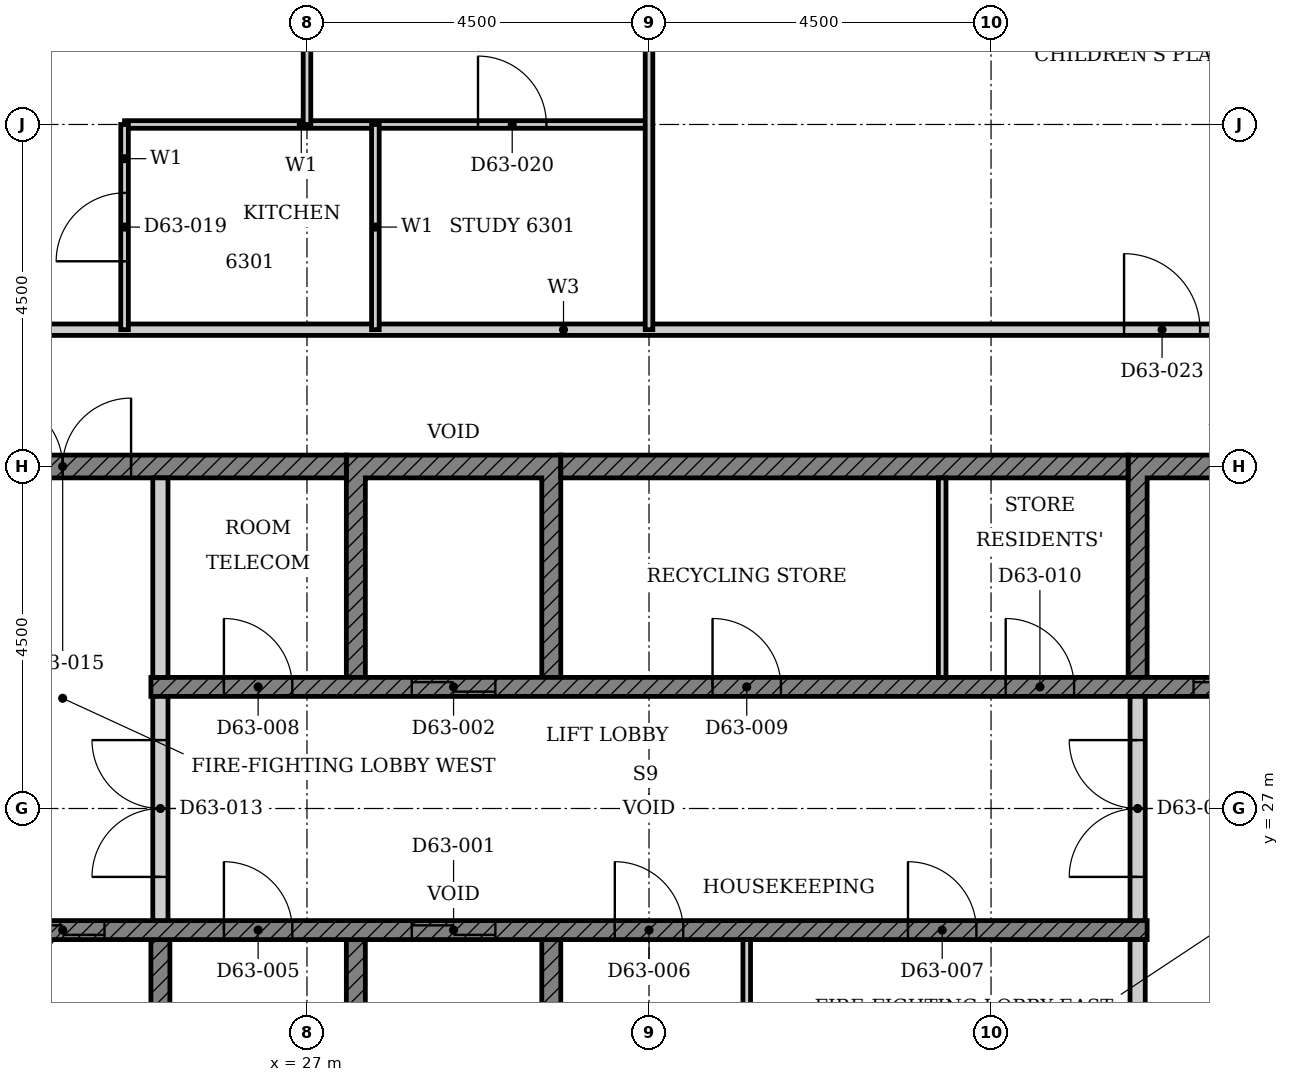
"""IFC4 building model, lengths in metres.
Left out: names, types, materials, properties, quantities, classifications, styles, units other than length and angle.
Written with IfcOpenShell. Run it as: python <this file> out.ifc"""

import sys

from ifc_helpers import new_model, si_unit, direction, frame, frame_2d, origin, place, context, subcontext, project, spatial, polyline, rectangle, outline, extrude, element, fill, save


model = new_model("IFC4")
c1 = context("Model", 3, precision=1e-05, world=origin(), true_north=direction((0.0, 1.0)))
c2 = subcontext(c1, "Body", "Model", "MODEL_VIEW")
j1 = project(units=[si_unit("LENGTHUNIT", "METRE"), si_unit("PLANEANGLEUNIT", "RADIAN")], contexts=[c1])
p1 = place(None, origin())
s1 = spatial("IfcSite", under=j1, at=p1, CompositionType="ELEMENT")
p2 = place(p1, origin())
s2 = spatial("IfcBuilding", under=s1, at=p2, CompositionType="ELEMENT")
p3 = place(p2, frame((0.0, 0.0, 249.0)))
s3 = spatial("IfcBuildingStorey", under=s2, at=p3, CompositionType="ELEMENT", Elevation=249.0)
p4 = place(p3, origin())
e1 = element("IfcWall", 1, at=p4, inside=s3, PredefinedType="SHEAR", context=c2, shape_type="SweptSolid", body=[
    extrude(outline(polyline([(22.375, 22.35), (25.197, 22.35), (25.197, 25.275), (24.947, 25.275), (24.947, 22.65), (22.625, 22.65), (22.625, 25.275), (22.375, 25.275), (22.375, 22.35)])), origin(), (0.0, 0.0, 1.0), 3.4),
])
p5 = place(p3, origin())
e2 = element("IfcWall", 2, at=p5, inside=s3, PredefinedType="SHEAR", context=c2, shape_type="SweptSolid", body=[
    extrude(outline(polyline([(27.518, 22.35), (30.339, 22.35), (30.339, 25.275), (30.089, 25.275), (30.089, 22.65), (27.768, 22.65), (27.768, 25.275), (27.518, 25.275), (27.518, 22.35)])), origin(), (0.0, 0.0, 1.0), 3.4),
])
p6 = place(p3, origin())
e3 = element("IfcWall", 3, at=p6, inside=s3, PredefinedType="SHEAR", context=c2, shape_type="SweptSolid", body=[
    extrude(outline(polyline([(27.518, 28.725), (27.768, 28.725), (27.768, 31.35), (30.089, 31.35), (30.089, 28.725), (30.339, 28.725), (30.339, 31.65), (27.518, 31.65), (27.518, 28.725)])), origin(), (0.0, 0.0, 1.0), 3.4),
])
p7 = place(p3, origin())
e4 = element("IfcWall", 4, at=p7, inside=s3, PredefinedType="SHEAR", context=c2, shape_type="SweptSolid", body=[
    extrude(outline(polyline([(37.803, 28.725), (38.053, 28.725), (38.053, 31.35), (40.375, 31.35), (40.375, 28.725), (40.625, 28.725), (40.625, 31.65), (37.803, 31.65), (37.803, 28.725)])), origin(), (0.0, 0.0, 1.0), 3.4),
])
p8 = place(p3, frame((18.15, 31.5, 0.0), z_axis=(0.0, 0.0, 1.0), x_axis=(1.0, 0.0, 0.0)))
e5 = element("IfcWall", 5, at=p8, inside=s3, PredefinedType="SHEAR", context=c2, shape_type="SweptSolid", body=[
    extrude(rectangle(XDim=9.368, YDim=0.3, at=frame_2d((4.684, 0.0))), origin(), (0.0, 0.0, 1.0), 3.4),
])
p9 = place(p8, frame((4.736, 0.0, 0.0)))
e6 = element("IfcOpeningElement", 6, at=p9, cuts=e5, PredefinedType="OPENING", context=c2, shape_type="SweptSolid", body=[
    extrude(rectangle(XDim=1.8, YDim=2.1, at=frame_2d((0.9, 1.05))), frame((0.0, 0.16, 0.0), z_axis=(0.0, -1.0, 0.0), x_axis=(1.0, 0.0, 0.0)), (0.0, 0.0, 1.0), 0.32),
])
p10 = place(p3, frame((30.339, 31.5, 0.0), z_axis=(0.0, 0.0, 1.0), x_axis=(1.0, 0.0, 0.0)))
e7 = element("IfcWall", 7, at=p10, inside=s3, PredefinedType="SHEAR", context=c2, shape_type="SweptSolid", body=[
    extrude(rectangle(XDim=7.464, YDim=0.3, at=frame_2d((3.732, 0.0))), origin(), (0.0, 0.0, 1.0), 3.4),
])
p11 = place(p3, frame((22.375, 25.4, 0.0), z_axis=(0.0, 0.0, 1.0), x_axis=(1.0, 0.0, 0.0)))
e8 = element("IfcWall", 8, at=p11, inside=s3, PredefinedType="SHEAR", context=c2, shape_type="SweptSolid", body=[
    extrude(rectangle(XDim=15.678, YDim=0.25, at=frame_2d((7.839, 0.0))), origin(), (0.0, 0.0, 1.0), 3.4),
])
p12 = place(p11, frame((6.004, 0.0, 0.0)))
e9 = element("IfcOpeningElement", 9, at=p12, cuts=e8, PredefinedType="OPENING", context=c2, shape_type="SweptSolid", body=[
    extrude(rectangle(XDim=1.1, YDim=2.1, at=frame_2d((0.55, 1.05))), frame((0.0, 0.135, 0.0), z_axis=(0.0, -1.0, 0.0), x_axis=(1.0, 0.0, 0.0)), (0.0, 0.0, 1.0), 0.27),
])
p13 = place(p11, frame((0.861, 0.0, 0.0)))
e10 = element("IfcOpeningElement", 10, at=p13, cuts=e8, PredefinedType="OPENING", context=c2, shape_type="SweptSolid", body=[
    extrude(rectangle(XDim=1.1, YDim=2.1, at=frame_2d((0.55, 1.05))), frame((0.0, 0.135, 0.0), z_axis=(0.0, -1.0, 0.0), x_axis=(1.0, 0.0, 0.0)), (0.0, 0.0, 1.0), 0.27),
])
p14 = place(p11, frame((3.532, 0.0, 0.0)))
e11 = element("IfcOpeningElement", 11, at=p14, cuts=e8, PredefinedType="OPENING", context=c2, shape_type="SweptSolid", body=[
    extrude(rectangle(XDim=0.9, YDim=2.1, at=frame_2d((0.45, 1.05))), frame((0.0, 0.135, 0.0), z_axis=(0.0, -1.0, 0.0), x_axis=(1.0, 0.0, 0.0)), (0.0, 0.0, 1.0), 0.27),
])
p15 = place(p11, frame((8.675, 0.0, 0.0)))
e12 = element("IfcOpeningElement", 12, at=p15, cuts=e8, PredefinedType="OPENING", context=c2, shape_type="SweptSolid", body=[
    extrude(rectangle(XDim=0.9, YDim=2.1, at=frame_2d((0.45, 1.05))), frame((0.0, 0.135, 0.0), z_axis=(0.0, -1.0, 0.0), x_axis=(1.0, 0.0, 0.0)), (0.0, 0.0, 1.0), 0.27),
])
p16 = place(p11, frame((12.532, 0.0, 0.0)))
e13 = element("IfcOpeningElement", 13, at=p16, cuts=e8, PredefinedType="OPENING", context=c2, shape_type="SweptSolid", body=[
    extrude(rectangle(XDim=0.9, YDim=2.1, at=frame_2d((0.45, 1.05))), frame((0.0, 0.135, 0.0), z_axis=(0.0, -1.0, 0.0), x_axis=(1.0, 0.0, 0.0)), (0.0, 0.0, 1.0), 0.27),
])
p17 = place(p3, frame((24.947, 28.6, 0.0), z_axis=(0.0, 0.0, 1.0), x_axis=(1.0, 0.0, 0.0)))
e14 = element("IfcWall", 14, at=p17, inside=s3, PredefinedType="SHEAR", context=c2, shape_type="SweptSolid", body=[
    extrude(rectangle(XDim=15.678, YDim=0.25, at=frame_2d((7.839, 0.0))), origin(), (0.0, 0.0, 1.0), 3.4),
])
p18 = place(p17, frame((3.432, 0.0, 0.0)))
e15 = element("IfcOpeningElement", 15, at=p18, cuts=e14, PredefinedType="OPENING", context=c2, shape_type="SweptSolid", body=[
    extrude(rectangle(XDim=1.1, YDim=2.1, at=frame_2d((0.55, 1.05))), frame((0.0, 0.135, 0.0), z_axis=(0.0, -1.0, 0.0), x_axis=(1.0, 0.0, 0.0)), (0.0, 0.0, 1.0), 0.27),
])
p19 = place(p17, frame((13.718, 0.0, 0.0)))
e16 = element("IfcOpeningElement", 16, at=p19, cuts=e14, PredefinedType="OPENING", context=c2, shape_type="SweptSolid", body=[
    extrude(rectangle(XDim=1.1, YDim=2.1, at=frame_2d((0.55, 1.05))), frame((0.0, 0.135, 0.0), z_axis=(0.0, -1.0, 0.0), x_axis=(1.0, 0.0, 0.0)), (0.0, 0.0, 1.0), 0.27),
])
p20 = place(p17, frame((0.961, 0.0, 0.0)))
e17 = element("IfcOpeningElement", 17, at=p20, cuts=e14, PredefinedType="OPENING", context=c2, shape_type="SweptSolid", body=[
    extrude(rectangle(XDim=0.9, YDim=2.1, at=frame_2d((0.45, 1.05))), frame((0.0, 0.135, 0.0), z_axis=(0.0, -1.0, 0.0), x_axis=(1.0, 0.0, 0.0)), (0.0, 0.0, 1.0), 0.27),
])
p21 = place(p17, frame((7.389, 0.0, 0.0)))
e18 = element("IfcOpeningElement", 18, at=p21, cuts=e14, PredefinedType="OPENING", context=c2, shape_type="SweptSolid", body=[
    extrude(rectangle(XDim=0.9, YDim=2.1, at=frame_2d((0.45, 1.05))), frame((0.0, 0.135, 0.0), z_axis=(0.0, -1.0, 0.0), x_axis=(1.0, 0.0, 0.0)), (0.0, 0.0, 1.0), 0.27),
])
p22 = place(p17, frame((11.246, 0.0, 0.0)))
e19 = element("IfcOpeningElement", 19, at=p22, cuts=e14, PredefinedType="OPENING", context=c2, shape_type="SweptSolid", body=[
    extrude(rectangle(XDim=0.9, YDim=2.1, at=frame_2d((0.45, 1.05))), frame((0.0, 0.135, 0.0), z_axis=(0.0, -1.0, 0.0), x_axis=(1.0, 0.0, 0.0)), (0.0, 0.0, 1.0), 0.27),
])
p23 = place(p3, frame((37.928, 22.65, 0.0), z_axis=(0.0, 0.0, 1.0), x_axis=(0.0, 1.0, 0.0)))
e20 = element("IfcWall", 20, at=p23, inside=s3, PredefinedType="PARTITIONING", context=c2, shape_type="SweptSolid", body=[
    extrude(rectangle(XDim=2.625, YDim=0.2, at=frame_2d((1.312, 0.0))), origin(), (0.0, 0.0, 1.0), 3.4),
])
p24 = place(p3, frame((32.786, 22.65, 0.0), z_axis=(0.0, 0.0, 1.0), x_axis=(0.0, 1.0, 0.0)))
e21 = element("IfcWall", 21, at=p24, inside=s3, PredefinedType="PARTITIONING", context=c2, shape_type="SweptSolid", body=[
    extrude(rectangle(XDim=2.625, YDim=0.1, at=frame_2d((1.312, 0.0))), origin(), (0.0, 0.0, 1.0), 3.4),
])
p25 = place(p3, frame((25.072, 28.725, 0.0), z_axis=(0.0, 0.0, 1.0), x_axis=(0.0, 1.0, 0.0)))
e22 = element("IfcWall", 22, at=p25, inside=s3, PredefinedType="PARTITIONING", context=c2, shape_type="SweptSolid", body=[
    extrude(rectangle(XDim=2.625, YDim=0.2, at=frame_2d((1.312, 0.0))), origin(), (0.0, 0.0, 1.0), 3.4),
])
p26 = place(p3, frame((35.357, 28.725, 0.0), z_axis=(0.0, 0.0, 1.0), x_axis=(0.0, 1.0, 0.0)))
e23 = element("IfcWall", 23, at=p26, inside=s3, PredefinedType="PARTITIONING", context=c2, shape_type="SweptSolid", body=[
    extrude(rectangle(XDim=2.625, YDim=0.1, at=frame_2d((1.312, 0.0))), origin(), (0.0, 0.0, 1.0), 3.4),
])
p27 = place(p3, frame((25.072, 25.525, 0.0), z_axis=(0.0, 0.0, 1.0), x_axis=(0.0, 1.0, 0.0)))
e24 = element("IfcWall", 24, at=p27, inside=s3, PredefinedType="PARTITIONING", context=c2, shape_type="SweptSolid", body=[
    extrude(rectangle(XDim=2.95, YDim=0.2, at=frame_2d((1.475, 0.0))), origin(), (0.0, 0.0, 1.0), 3.4),
])
p28 = place(p27, frame((0.575, 0.0, 0.0)))
e25 = element("IfcOpeningElement", 25, at=p28, cuts=e24, PredefinedType="OPENING", context=c2, shape_type="SweptSolid", body=[
    extrude(rectangle(XDim=1.8, YDim=2.1, at=frame_2d((0.9, 1.05))), frame((0.0, 0.11, 0.0), z_axis=(0.0, -1.0, 0.0), x_axis=(1.0, 0.0, 0.0)), (0.0, 0.0, 1.0), 0.22),
])
p29 = place(p3, frame((37.928, 25.525, 0.0), z_axis=(0.0, 0.0, 1.0), x_axis=(0.0, 1.0, 0.0)))
e26 = element("IfcWall", 26, at=p29, inside=s3, PredefinedType="PARTITIONING", context=c2, shape_type="SweptSolid", body=[
    extrude(rectangle(XDim=2.95, YDim=0.2, at=frame_2d((1.475, 0.0))), origin(), (0.0, 0.0, 1.0), 3.4),
])
p30 = place(p29, frame((0.575, 0.0, 0.0)))
e27 = element("IfcOpeningElement", 27, at=p30, cuts=e26, PredefinedType="OPENING", context=c2, shape_type="SweptSolid", body=[
    extrude(rectangle(XDim=1.8, YDim=2.1, at=frame_2d((0.9, 1.05))), frame((0.0, 0.11, 0.0), z_axis=(0.0, -1.0, 0.0), x_axis=(1.0, 0.0, 0.0)), (0.0, 0.0, 1.0), 0.22),
])
p31 = place(p3, frame((20.4, 33.3, 0.0), z_axis=(0.0, 0.0, 1.0), x_axis=(1.0, 0.0, 0.0)))
e28 = element("IfcWall", 28, at=p31, inside=s3, PredefinedType="PARTITIONING", context=c2, shape_type="SweptSolid", body=[
    extrude(rectangle(XDim=24.6, YDim=0.15, at=frame_2d((12.3, 0.0))), origin(), (0.0, 0.0, 1.0), 3.4),
])
p32 = place(p31, frame((1.6, 0.0, 0.0)))
e29 = element("IfcOpeningElement", 29, at=p32, cuts=e28, PredefinedType="OPENING", context=c2, shape_type="SweptSolid", body=[
    extrude(rectangle(XDim=1.0, YDim=2.2, at=frame_2d((0.5, 1.1))), frame((0.0, 0.085, 0.0), z_axis=(0.0, -1.0, 0.0), x_axis=(1.0, 0.0, 0.0)), (0.0, 0.0, 1.0), 0.17),
])
p33 = place(p31, frame((17.35, 0.0, 0.0)))
e30 = element("IfcOpeningElement", 30, at=p33, cuts=e28, PredefinedType="OPENING", context=c2, shape_type="SweptSolid", body=[
    extrude(rectangle(XDim=1.0, YDim=2.1, at=frame_2d((0.5, 1.05))), frame((0.0, 0.085, 0.0), z_axis=(0.0, -1.0, 0.0), x_axis=(1.0, 0.0, 0.0)), (0.0, 0.0, 1.0), 0.17),
])
p34 = place(p3, frame((24.6, 36.0, 0.0), z_axis=(0.0, 0.0, 1.0), x_axis=(1.0, 0.0, 0.0)))
e31 = element("IfcWall", 31, at=p34, inside=s3, PredefinedType="PARTITIONING", context=c2, shape_type="SweptSolid", body=[
    extrude(rectangle(XDim=6.9, YDim=0.1, at=frame_2d((3.45, 0.0))), origin(), (0.0, 0.0, 1.0), 3.4),
])
p35 = place(p34, frame((4.65, 0.0, 0.0)))
e32 = element("IfcOpeningElement", 32, at=p35, cuts=e31, PredefinedType="OPENING", context=c2, shape_type="SweptSolid", body=[
    extrude(rectangle(XDim=0.9, YDim=2.1, at=frame_2d((0.45, 1.05))), frame((0.0, 0.06, 0.0), z_axis=(0.0, -1.0, 0.0), x_axis=(1.0, 0.0, 0.0)), (0.0, 0.0, 1.0), 0.12),
])
p36 = place(p3, frame((24.6, 33.3, 0.0), z_axis=(0.0, 0.0, 1.0), x_axis=(0.0, 1.0, 0.0)))
e33 = element("IfcWall", 33, at=p36, inside=s3, PredefinedType="PARTITIONING", context=c2, shape_type="SweptSolid", body=[
    extrude(rectangle(XDim=2.7, YDim=0.1, at=frame_2d((1.35, 0.0))), origin(), (0.0, 0.0, 1.0), 3.4),
])
p37 = place(p36, frame((0.9, 0.0, 0.0)))
e34 = element("IfcOpeningElement", 34, at=p37, cuts=e33, PredefinedType="OPENING", context=c2, shape_type="SweptSolid", body=[
    extrude(rectangle(XDim=0.9, YDim=2.1, at=frame_2d((0.45, 1.05))), frame((0.0, 0.06, 0.0), z_axis=(0.0, -1.0, 0.0), x_axis=(1.0, 0.0, 0.0)), (0.0, 0.0, 1.0), 0.12),
])
p38 = place(p3, frame((27.0, 36.0, 0.0), z_axis=(0.0, 0.0, 1.0), x_axis=(0.0, 1.0, 0.0)))
e35 = element("IfcWall", 35, at=p38, inside=s3, PredefinedType="PARTITIONING", context=c2, shape_type="SweptSolid", body=[
    extrude(rectangle(XDim=4.69, YDim=0.1, at=frame_2d((2.345, 0.0))), origin(), (0.0, 0.0, 1.0), 3.4),
])
p39 = place(p38, frame((1.8, 0.0, 0.0)))
e36 = element("IfcOpeningElement", 36, at=p39, cuts=e35, PredefinedType="OPENING", context=c2, shape_type="SweptSolid", body=[
    extrude(rectangle(XDim=0.9, YDim=2.1, at=frame_2d((0.45, 1.05))), frame((0.0, 0.06, 0.0), z_axis=(0.0, -1.0, 0.0), x_axis=(1.0, 0.0, 0.0)), (0.0, 0.0, 1.0), 0.12),
])
p40 = place(p3, frame((27.9, 33.3, 0.0), z_axis=(0.0, 0.0, 1.0), x_axis=(0.0, 1.0, 0.0)))
e37 = element("IfcWall", 37, at=p40, inside=s3, PredefinedType="PARTITIONING", context=c2, shape_type="SweptSolid", body=[
    extrude(rectangle(XDim=2.7, YDim=0.1, at=frame_2d((1.35, 0.0))), origin(), (0.0, 0.0, 1.0), 3.4),
])
p41 = place(p3, frame((31.5, 33.3, 0.0), z_axis=(0.0, 0.0, 1.0), x_axis=(0.0, 1.0, 0.0)))
e38 = element("IfcWall", 38, at=p41, inside=s3, PredefinedType="PARTITIONING", context=c2, shape_type="SweptSolid", body=[
    extrude(rectangle(XDim=7.44, YDim=0.1, at=frame_2d((3.72, 0.0))), origin(), (0.0, 0.0, 1.0), 3.4),
])
p42 = place(p12, origin())
e39 = element("IfcDoor", 39, at=p42, inside=s3, OperationType="DOUBLE_DOOR_SLIDING", PredefinedType="DOOR", context=c2, shape_type="SweptSolid", body=[
    extrude(rectangle(XDim=1.1, YDim=2.1, at=frame_2d((0.55, 1.05))), frame((0.0, 0.025, 0.0), z_axis=(0.0, -1.0, 0.0), x_axis=(1.0, 0.0, 0.0)), (0.0, 0.0, 1.0), 0.05),
])
fill(e9, e39)
p43 = place(p18, origin())
e40 = element("IfcDoor", 40, at=p43, inside=s3, OperationType="DOUBLE_DOOR_SLIDING", PredefinedType="DOOR", context=c2, shape_type="SweptSolid", body=[
    extrude(rectangle(XDim=1.1, YDim=2.1, at=frame_2d((0.55, 1.05))), frame((0.0, 0.025, 0.0), z_axis=(0.0, -1.0, 0.0), x_axis=(1.0, 0.0, 0.0)), (0.0, 0.0, 1.0), 0.05),
])
fill(e15, e40)
p44 = place(p13, origin())
e41 = element("IfcDoor", 41, at=p44, inside=s3, OperationType="DOUBLE_DOOR_SLIDING", PredefinedType="DOOR", context=c2, shape_type="SweptSolid", body=[
    extrude(rectangle(XDim=1.1, YDim=2.1, at=frame_2d((0.55, 1.05))), frame((0.0, 0.025, 0.0), z_axis=(0.0, -1.0, 0.0), x_axis=(1.0, 0.0, 0.0)), (0.0, 0.0, 1.0), 0.05),
])
fill(e10, e41)
p45 = place(p19, origin())
e42 = element("IfcDoor", 42, at=p45, inside=s3, OperationType="DOUBLE_DOOR_SLIDING", PredefinedType="DOOR", context=c2, shape_type="SweptSolid", body=[
    extrude(rectangle(XDim=1.1, YDim=2.1, at=frame_2d((0.55, 1.05))), frame((0.0, 0.025, 0.0), z_axis=(0.0, -1.0, 0.0), x_axis=(1.0, 0.0, 0.0)), (0.0, 0.0, 1.0), 0.05),
])
fill(e16, e42)
p46 = place(p14, origin())
e43 = element("IfcDoor", 43, at=p46, inside=s3, OperationType="SINGLE_SWING_LEFT", PredefinedType="DOOR", context=c2, shape_type="SweptSolid", body=[
    extrude(rectangle(XDim=0.9, YDim=2.1, at=frame_2d((0.45, 1.05))), frame((0.0, 0.025, 0.0), z_axis=(0.0, -1.0, 0.0), x_axis=(1.0, 0.0, 0.0)), (0.0, 0.0, 1.0), 0.05),
])
fill(e11, e43)
p47 = place(p15, origin())
e44 = element("IfcDoor", 44, at=p47, inside=s3, OperationType="SINGLE_SWING_LEFT", PredefinedType="DOOR", context=c2, shape_type="SweptSolid", body=[
    extrude(rectangle(XDim=0.9, YDim=2.1, at=frame_2d((0.45, 1.05))), frame((0.0, 0.025, 0.0), z_axis=(0.0, -1.0, 0.0), x_axis=(1.0, 0.0, 0.0)), (0.0, 0.0, 1.0), 0.05),
])
fill(e12, e44)
p48 = place(p16, origin())
e45 = element("IfcDoor", 45, at=p48, inside=s3, OperationType="SINGLE_SWING_LEFT", PredefinedType="DOOR", context=c2, shape_type="SweptSolid", body=[
    extrude(rectangle(XDim=0.9, YDim=2.1, at=frame_2d((0.45, 1.05))), frame((0.0, 0.025, 0.0), z_axis=(0.0, -1.0, 0.0), x_axis=(1.0, 0.0, 0.0)), (0.0, 0.0, 1.0), 0.05),
])
fill(e13, e45)
p49 = place(p20, origin())
e46 = element("IfcDoor", 46, at=p49, inside=s3, OperationType="SINGLE_SWING_LEFT", PredefinedType="DOOR", context=c2, shape_type="SweptSolid", body=[
    extrude(rectangle(XDim=0.9, YDim=2.1, at=frame_2d((0.45, 1.05))), frame((0.0, 0.025, 0.0), z_axis=(0.0, -1.0, 0.0), x_axis=(1.0, 0.0, 0.0)), (0.0, 0.0, 1.0), 0.05),
])
fill(e17, e46)
p50 = place(p21, origin())
e47 = element("IfcDoor", 47, at=p50, inside=s3, OperationType="SINGLE_SWING_LEFT", PredefinedType="DOOR", context=c2, shape_type="SweptSolid", body=[
    extrude(rectangle(XDim=0.9, YDim=2.1, at=frame_2d((0.45, 1.05))), frame((0.0, 0.025, 0.0), z_axis=(0.0, -1.0, 0.0), x_axis=(1.0, 0.0, 0.0)), (0.0, 0.0, 1.0), 0.05),
])
fill(e18, e47)
p51 = place(p22, origin())
e48 = element("IfcDoor", 48, at=p51, inside=s3, OperationType="SINGLE_SWING_LEFT", PredefinedType="DOOR", context=c2, shape_type="SweptSolid", body=[
    extrude(rectangle(XDim=0.9, YDim=2.1, at=frame_2d((0.45, 1.05))), frame((0.0, 0.025, 0.0), z_axis=(0.0, -1.0, 0.0), x_axis=(1.0, 0.0, 0.0)), (0.0, 0.0, 1.0), 0.05),
])
fill(e19, e48)
p52 = place(p28, origin())
e49 = element("IfcDoor", 49, at=p52, inside=s3, OperationType="DOUBLE_DOOR_SINGLE_SWING", PredefinedType="DOOR", context=c2, shape_type="SweptSolid", body=[
    extrude(rectangle(XDim=1.8, YDim=2.1, at=frame_2d((0.9, 1.05))), frame((0.0, 0.025, 0.0), z_axis=(0.0, -1.0, 0.0), x_axis=(1.0, 0.0, 0.0)), (0.0, 0.0, 1.0), 0.05),
])
fill(e25, e49)
p53 = place(p30, origin())
e50 = element("IfcDoor", 50, at=p53, inside=s3, OperationType="DOUBLE_DOOR_SINGLE_SWING", PredefinedType="DOOR", context=c2, shape_type="SweptSolid", body=[
    extrude(rectangle(XDim=1.8, YDim=2.1, at=frame_2d((0.9, 1.05))), frame((0.0, 0.025, 0.0), z_axis=(0.0, -1.0, 0.0), x_axis=(1.0, 0.0, 0.0)), (0.0, 0.0, 1.0), 0.05),
])
fill(e27, e50)
p54 = place(p9, origin())
e51 = element("IfcDoor", 51, at=p54, inside=s3, OperationType="DOUBLE_DOOR_SINGLE_SWING", PredefinedType="DOOR", context=c2, shape_type="SweptSolid", body=[
    extrude(rectangle(XDim=1.8, YDim=2.1, at=frame_2d((0.9, 1.05))), frame((0.0, 0.025, 0.0), z_axis=(0.0, -1.0, 0.0), x_axis=(1.0, 0.0, 0.0)), (0.0, 0.0, 1.0), 0.05),
])
fill(e6, e51)
p55 = place(p37, origin())
e52 = element("IfcDoor", 52, at=p55, inside=s3, OperationType="SINGLE_SWING_RIGHT", PredefinedType="DOOR", context=c2, shape_type="SweptSolid", body=[
    extrude(rectangle(XDim=0.9, YDim=2.1, at=frame_2d((0.45, 1.05))), frame((0.0, 0.025, 0.0), z_axis=(0.0, -1.0, 0.0), x_axis=(1.0, 0.0, 0.0)), (0.0, 0.0, 1.0), 0.05),
])
fill(e34, e52)
p56 = place(p35, origin())
e53 = element("IfcDoor", 53, at=p56, inside=s3, OperationType="SINGLE_SWING_LEFT", PredefinedType="DOOR", context=c2, shape_type="SweptSolid", body=[
    extrude(rectangle(XDim=0.9, YDim=2.1, at=frame_2d((0.45, 1.05))), frame((0.0, 0.025, 0.0), z_axis=(0.0, -1.0, 0.0), x_axis=(1.0, 0.0, 0.0)), (0.0, 0.0, 1.0), 0.05),
])
fill(e32, e53)
p57 = place(p33, origin())
e54 = element("IfcDoor", 54, at=p57, inside=s3, OperationType="SINGLE_SWING_LEFT", PredefinedType="DOOR", context=c2, shape_type="SweptSolid", body=[
    extrude(rectangle(XDim=1.0, YDim=2.1, at=frame_2d((0.5, 1.05))), frame((0.0, 0.025, 0.0), z_axis=(0.0, -1.0, 0.0), x_axis=(1.0, 0.0, 0.0)), (0.0, 0.0, 1.0), 0.05),
])
fill(e30, e54)
save(model, sys.argv[1])
